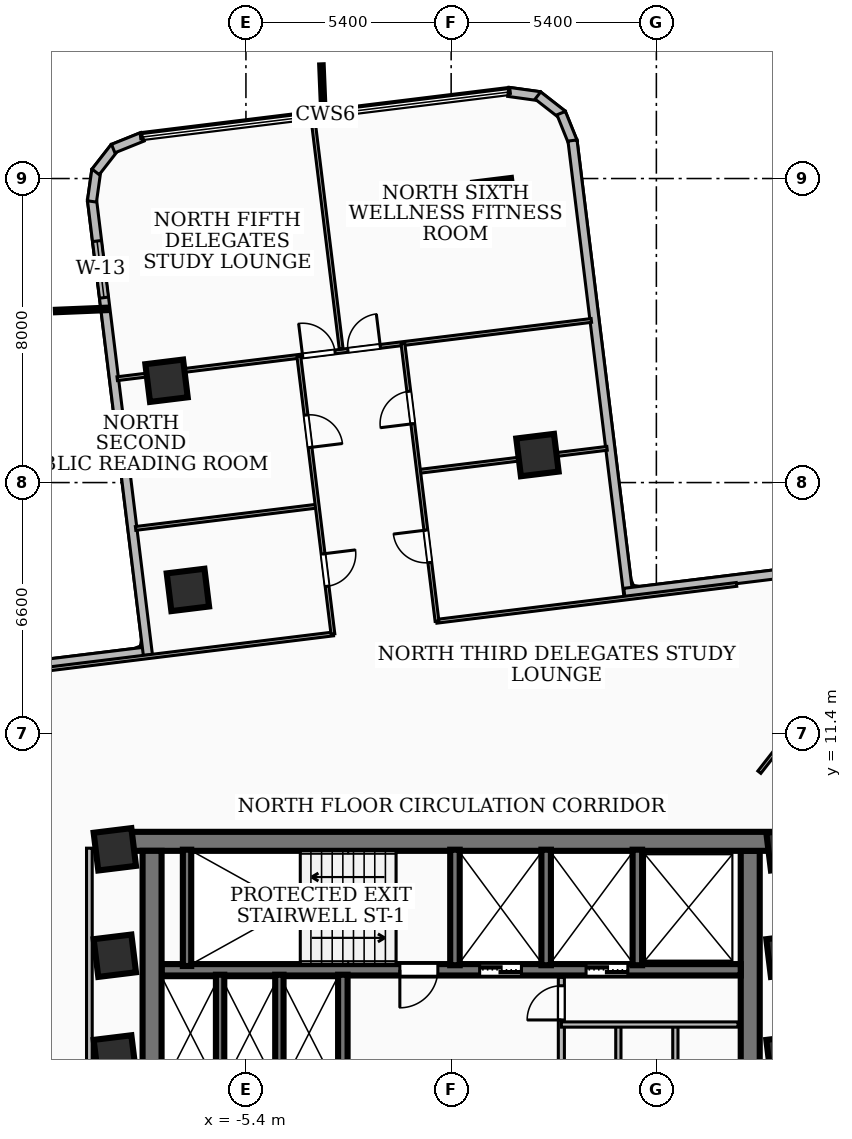
"""IFC4 building model, lengths in metres.
Left out: names, types, materials, properties, quantities, classifications, styles, units other than length and angle.
Written with IfcOpenShell. Run it as: python <this file> out.ifc"""

import sys

from ifc_helpers import new_model, si_unit, direction, frame, frame_2d, origin, origin_2d, place, context, subcontext, project, spatial, rectangle, extrude, element, fill, save


model = new_model("IFC4")
c1 = context("Model", 3, precision=1e-05, world=origin(), true_north=direction((0.0, 1.0)))
c2 = subcontext(c1, "Body", "Model", "MODEL_VIEW")
j1 = project(units=[si_unit("LENGTHUNIT", "METRE"), si_unit("PLANEANGLEUNIT", "RADIAN")], contexts=[c1])
p1 = place(None, origin())
s1 = spatial("IfcSite", under=j1, at=p1, CompositionType="ELEMENT")
p2 = place(p1, origin())
s2 = spatial("IfcBuilding", under=s1, at=p2, CompositionType="ELEMENT")
p3 = place(p2, frame((0.0, 0.0, 82.08)))
s3 = spatial("IfcBuildingStorey", under=s2, at=p3, CompositionType="ELEMENT", Elevation=82.08)
p4 = place(p3, frame((-8.78, 8.56, 0.0), z_axis=(0.0, 0.0, 1.0), x_axis=(1.0, 0.0, 0.0)))
e1 = element("IfcWall", 1, at=p4, inside=s3, PredefinedType="SHEAR", context=c2, shape_type="SweptSolid", body=[
    extrude(rectangle(XDim=17.56, YDim=0.5, at=frame_2d((8.78, 0.0))), origin(), (0.0, 0.0, 1.0), 3.34),
])
for number, where, z_axis, x_axis in (
    (2, (-7.87, 2.0, 0.0), (0.0, 0.0, 1.0), (0.0, 1.0, 0.0)),
    (3, (7.87, 8.31, 0.0), (0.0, 0.0, 1.0), (0.0, -1.0, 0.0)),
):
    element("IfcWall", number, at=place(p3, frame(where, z_axis=z_axis, x_axis=x_axis)), inside=s3, PredefinedType="SHEAR", context=c2, shape_type="SweptSolid", body=[
        extrude(rectangle(XDim=6.31, YDim=0.5, at=frame_2d((3.155, 0.0))), origin(), (0.0, 0.0, 1.0), 3.34),
    ])
p5 = place(p3, frame((7.62, 5.18, 0.0), z_axis=(0.0, 0.0, 1.0), x_axis=(-1.0, 0.0, 0.0)))
e4 = element("IfcWall", 4, at=p5, inside=s3, PredefinedType="SOLIDWALL", context=c2, shape_type="SweptSolid", body=[
    extrude(rectangle(XDim=15.24, YDim=0.3, at=frame_2d((7.62, 0.0))), origin(), (0.0, 0.0, 1.0), 3.34),
])
p6 = place(p5, frame((5.77, 0.0, 0.0)))
e5 = element("IfcOpeningElement", 5, at=p6, cuts=e4, PredefinedType="OPENING", context=c2, shape_type="SweptSolid", body=[
    extrude(rectangle(XDim=1.1, YDim=2.15, at=frame_2d((0.55, 1.075))), frame((0.0, 0.16, 0.0), z_axis=(0.0, -1.0, 0.0), x_axis=(1.0, 0.0, 0.0)), (0.0, 0.0, 1.0), 0.32),
])
p7 = place(p5, frame((2.97, 0.0, 0.0)))
e6 = element("IfcOpeningElement", 6, at=p7, cuts=e4, PredefinedType="OPENING", context=c2, shape_type="SweptSolid", body=[
    extrude(rectangle(XDim=1.1, YDim=2.15, at=frame_2d((0.55, 1.075))), frame((0.0, 0.16, 0.0), z_axis=(0.0, -1.0, 0.0), x_axis=(1.0, 0.0, 0.0)), (0.0, 0.0, 1.0), 0.32),
])
p8 = place(p5, frame((7.97, 0.0, 0.0)))
e7 = element("IfcOpeningElement", 7, at=p8, cuts=e4, PredefinedType="OPENING", context=c2, shape_type="SweptSolid", body=[
    extrude(rectangle(XDim=1.0, YDim=2.1, at=frame_2d((0.5, 1.05))), frame((0.0, 0.16, 0.0), z_axis=(0.0, -1.0, 0.0), x_axis=(1.0, 0.0, 0.0)), (0.0, 0.0, 1.0), 0.32),
])
p9 = place(p3, frame((-6.95, 5.28, 0.0), z_axis=(0.0, 0.0, 1.0), x_axis=(0.0, 1.0, 0.0)))
e8 = element("IfcWall", 8, at=p9, inside=s3, PredefinedType="SOLIDWALL", context=c2, shape_type="SweptSolid", body=[
    extrude(rectangle(XDim=3.06, YDim=0.22, at=frame_2d((1.53, 0.0))), origin(), (0.0, 0.0, 1.0), 3.34),
])
for number, where, z_axis, x_axis in (
    (9, (0.1, 5.3, 0.0), (0.0, 0.0, 1.0), (0.0, 1.0, 0.0)),
    (10, (2.5, 5.3, 0.0), (0.0, 0.0, 1.0), (0.0, 1.0, 0.0)),
    (11, (4.9, 5.3, 0.0), (0.0, 0.0, 1.0), (0.0, 1.0, 0.0)),
):
    element("IfcWall", number, at=place(p3, frame(where, z_axis=z_axis, x_axis=x_axis)), inside=s3, PredefinedType="SOLIDWALL", context=c2, shape_type="SweptSolid", body=[
        extrude(rectangle(XDim=3.04, YDim=0.25, at=frame_2d((1.52, 0.0))), origin(), (0.0, 0.0, 1.0), 3.34),
    ])
p10 = place(p3, frame((-2.85, 1.98, 0.0), z_axis=(0.0, 0.0, 1.0), x_axis=(0.0, 1.0, 0.0)))
e12 = element("IfcWall", 12, at=p10, inside=s3, PredefinedType="SOLIDWALL", context=c2, shape_type="SweptSolid", body=[
    extrude(rectangle(XDim=3.07, YDim=0.25, at=frame_2d((1.535, 0.0))), origin(), (0.0, 0.0, 1.0), 3.34),
])
for number, where, z_axis, x_axis in (
    (13, (-6.08, 1.98, 0.0), (0.0, 0.0, 1.0), (0.0, 1.0, 0.0)),
    (14, (-4.52, 1.98, 0.0), (0.0, 0.0, 1.0), (0.0, 1.0, 0.0)),
):
    element("IfcWall", number, at=place(p3, frame(where, z_axis=z_axis, x_axis=x_axis)), inside=s3, PredefinedType="SOLIDWALL", context=c2, shape_type="SweptSolid", body=[
        extrude(rectangle(XDim=3.07, YDim=0.22, at=frame_2d((1.535, 0.0))), origin(), (0.0, 0.0, 1.0), 3.34),
    ])
for number, where, z_axis, x_axis in (
    (15, (-8.85, 2.9, 0.0), (0.0, 0.0, 1.0), (0.993, 0.122, 0.0)),
    (16, (-8.85, 5.55, 0.0), (0.0, 0.0, 1.0), (0.993, 0.122, 0.0)),
    (17, (8.85, 2.9, 0.0), (0.0, 0.0, 1.0), (0.993, 0.122, 0.0)),
    (18, (8.85, 5.55, 0.0), (0.0, 0.0, 1.0), (0.993, 0.122, 0.0)),
    (19, (-8.85, 8.35, 0.0), (0.0, 0.0, 1.0), (0.993, 0.122, 0.0)),
    (20, (8.85, 8.35, 0.0), (0.0, 0.0, 1.0), (0.993, 0.122, 0.0)),
    (21, (2.271, 18.724, 0.0), (0.0, 0.0, 1.0), (0.993, 0.122, 0.0)),
    (22, (-6.927, 15.175, 0.0), (0.0, 0.0, 1.0), (0.993, 0.122, 0.0)),
    (23, (1.139, 25.457, 0.0), (0.0, 0.0, 1.0), (0.993, 0.122, 0.0)),
    (24, (-7.489, 20.679, 0.0), (0.0, 0.0, 1.0), (0.993, 0.122, 0.0)),
):
    element("IfcColumn", number, at=place(p3, frame(where, z_axis=z_axis, x_axis=x_axis)), inside=s3, PredefinedType="COLUMN", context=c2, shape_type="SweptSolid", body=[
        extrude(rectangle(XDim=1.0, YDim=1.0, at=origin_2d()), origin(), (0.0, 0.0, 1.0), 3.6),
    ])
p11 = place(p3, frame((-14.621, 12.743, 0.0), z_axis=(0.0, 0.0, 1.0), x_axis=(0.992536263595, 0.121949848087, 0.0)))
e25 = element("IfcWall", 25, at=p11, inside=s3, PredefinedType="SOLIDWALL", context=c2, shape_type="SweptSolid", body=[
    extrude(rectangle(XDim=6.775, YDim=0.24, at=frame_2d((3.387, 0.0))), origin(), (0.0, 0.0, 1.0), 3.34),
])
p12 = place(p3, frame((-7.98, 13.462, 0.0), z_axis=(0.0, 0.0, 1.0), x_axis=(-0.12189689255, 0.992542768644, 0.0)))
e26 = element("IfcWall", 26, at=p12, inside=s3, PredefinedType="SOLIDWALL", context=c2, shape_type="SweptSolid", body=[
    extrude(rectangle(XDim=12.075, YDim=0.24, at=frame_2d((6.038, 0.0))), origin(), (0.0, 0.0, 1.0), 3.34),
])
p13 = place(p12, frame((9.475, 0.0, 0.85)))
e27 = element("IfcOpeningElement", 27, at=p13, cuts=e26, PredefinedType="OPENING", context=c2, shape_type="SweptSolid", body=[
    extrude(rectangle(XDim=1.5, YDim=1.8, at=frame_2d((0.75, 0.9))), frame((0.0, 0.13, 0.0), z_axis=(0.0, -1.0, 0.0), x_axis=(1.0, 0.0, 0.0)), (0.0, 0.0, 1.0), 0.26),
])
p14 = place(p3, frame((-9.452, 25.397, 0.0), z_axis=(0.0, 0.0, 1.0), x_axis=(0.138376981782, 0.990379629694, 0.0)))
e28 = element("IfcWall", 28, at=p14, inside=s3, PredefinedType="SOLIDWALL", context=c2, shape_type="SweptSolid", body=[
    extrude(rectangle(XDim=0.831, YDim=0.24, at=frame_2d((0.416, 0.0))), origin(), (0.0, 0.0, 1.0), 3.34),
])
p15 = place(p3, frame((-9.355, 26.175, 0.0), z_axis=(0.0, 0.0, 1.0), x_axis=(0.614542882467, 0.788883416995, 0.0)))
e29 = element("IfcWall", 29, at=p15, inside=s3, PredefinedType="SOLIDWALL", context=c2, shape_type="SweptSolid", body=[
    extrude(rectangle(XDim=0.814, YDim=0.24, at=frame_2d((0.407, 0.0))), origin(), (0.0, 0.0, 1.0), 3.34),
])
p16 = place(p3, frame((-8.893, 26.788, 0.0), z_axis=(0.0, 0.0, 1.0), x_axis=(0.927724225254, 0.37326634174, 0.0)))
e30 = element("IfcWall", 30, at=p16, inside=s3, PredefinedType="SOLIDWALL", context=c2, shape_type="SweptSolid", body=[
    extrude(rectangle(XDim=0.83, YDim=0.24, at=frame_2d((0.415, 0.0))), origin(), (0.0, 0.0, 1.0), 3.34),
])
p17 = place(p3, frame((1.504, 28.28, 0.0), z_axis=(0.0, 0.0, 1.0), x_axis=(0.990540037659, -0.137224027762, 0.0)))
e31 = element("IfcWall", 31, at=p17, inside=s3, PredefinedType="SOLIDWALL", context=c2, shape_type="SweptSolid", body=[
    extrude(rectangle(XDim=0.831, YDim=0.24, at=frame_2d((0.416, 0.0))), origin(), (0.0, 0.0, 1.0), 3.34),
])
p18 = place(p3, frame((2.282, 28.184, 0.0), z_axis=(0.0, 0.0, 1.0), x_axis=(0.788415071083, -0.615143622001, 0.0)))
e32 = element("IfcWall", 32, at=p18, inside=s3, PredefinedType="SOLIDWALL", context=c2, shape_type="SweptSolid", body=[
    extrude(rectangle(XDim=0.814, YDim=0.24, at=frame_2d((0.407, 0.0))), origin(), (0.0, 0.0, 1.0), 3.34),
])
p19 = place(p3, frame((2.895, 27.721, 0.0), z_axis=(0.0, 0.0, 1.0), x_axis=(0.373927487679, -0.927457941881, 0.0)))
e33 = element("IfcWall", 33, at=p19, inside=s3, PredefinedType="SOLIDWALL", context=c2, shape_type="SweptSolid", body=[
    extrude(rectangle(XDim=0.829, YDim=0.24, at=frame_2d((0.415, 0.0))), origin(), (0.0, 0.0, 1.0), 3.34),
])
p20 = place(p3, frame((3.193, 27.0, 0.0), z_axis=(0.0, 0.0, 1.0), x_axis=(0.12189689255, -0.992542768644, 0.0)))
e34 = element("IfcWall", 34, at=p20, inside=s3, PredefinedType="SOLIDWALL", context=c2, shape_type="SweptSolid", body=[
    extrude(rectangle(XDim=12.075, YDim=0.24, at=frame_2d((6.038, 0.0))), origin(), (0.0, 0.0, 1.0), 2.486),
])
p21 = place(p3, frame((4.558, 15.098, 0.0), z_axis=(0.0, 0.0, 1.0), x_axis=(0.992537639855, 0.121938646341, 0.0)))
e35 = element("IfcWall", 35, at=p21, inside=s3, PredefinedType="SOLIDWALL", context=c2, shape_type="SweptSolid", body=[
    extrude(rectangle(XDim=6.595, YDim=0.24, at=frame_2d((3.298, 0.0))), origin(), (0.0, 0.0, 1.0), 2.486),
])
p22 = place(p3, frame((2.9, 2.04, 0.0), z_axis=(0.0, 0.0, 1.0), x_axis=(0.0, 1.0, 0.0)))
e36 = element("IfcWall", 36, at=p22, inside=s3, PredefinedType="PARTITIONING", context=c2, shape_type="SweptSolid", body=[
    extrude(rectangle(XDim=2.94, YDim=0.16, at=frame_2d((1.47, 0.0))), origin(), (0.0, 0.0, 1.0), 2.405),
])
p23 = place(p22, frame((1.82, 0.0, 0.0)))
e37 = element("IfcOpeningElement", 37, at=p23, cuts=e36, PredefinedType="OPENING", context=c2, shape_type="SweptSolid", body=[
    extrude(rectangle(XDim=0.9, YDim=2.06, at=frame_2d((0.45, 1.03))), frame((0.0, 0.09, 0.0), z_axis=(0.0, -1.0, 0.0), x_axis=(1.0, 0.0, 0.0)), (0.0, 0.0, 1.0), 0.18),
])
p24 = place(p3, frame((2.9, 3.74, 0.0), z_axis=(0.0, 0.0, 1.0), x_axis=(1.0, 0.0, 0.0)))
e38 = element("IfcWall", 38, at=p24, inside=s3, PredefinedType="PARTITIONING", context=c2, shape_type="SweptSolid", body=[
    extrude(rectangle(XDim=4.65, YDim=0.138, at=frame_2d((2.325, 0.0))), origin(), (0.0, 0.0, 1.0), 3.34),
])
for number, where, z_axis, x_axis in (
    (39, (4.4, 1.85, 0.0), (0.0, 0.0, 1.0), (0.0, 1.0, 0.0)),
    (40, (5.9, 1.85, 0.0), (0.0, 0.0, 1.0), (0.0, 1.0, 0.0)),
):
    element("IfcWall", number, at=place(p3, frame(where, z_axis=z_axis, x_axis=x_axis)), inside=s3, PredefinedType="PARTITIONING", context=c2, shape_type="SweptSolid", body=[
        extrude(rectangle(XDim=1.89, YDim=0.138, at=frame_2d((0.945, 0.0))), origin(), (0.0, 0.0, 1.0), 2.405),
    ])
p25 = place(p3, frame((-9.52, 1.75, 0.0), z_axis=(0.0, 0.0, 1.0), x_axis=(0.0, 1.0, 0.0)))
e41 = element("IfcWall", 41, at=p25, inside=s3, PredefinedType="PARTITIONING", context=c2, shape_type="SweptSolid", body=[
    extrude(rectangle(XDim=6.63, YDim=0.15, at=frame_2d((3.315, 0.0))), origin(), (0.0, 0.0, 1.0), 2.486),
])
p26 = place(p3, frame((8.11, 10.38, 0.0), z_axis=(0.0, 0.0, 1.0), x_axis=(0.615665236773, 0.788007814828, 0.0)))
e42 = element("IfcWall", 42, at=p26, inside=s3, PredefinedType="PARTITIONING", context=c2, shape_type="SweptSolid", body=[
    extrude(rectangle(XDim=6.482, YDim=0.1, at=frame_2d((3.241, 0.0))), origin(), (0.0, 0.0, 1.0), 3.34),
])
p27 = place(p3, frame((-3.101, 14.017, 0.0), z_axis=(0.0, 0.0, 1.0), x_axis=(-0.992524448483, -0.122045971517, 0.0)))
e43 = element("IfcWall", 43, at=p27, inside=s3, PredefinedType="PARTITIONING", context=c2, shape_type="SweptSolid", body=[
    extrude(rectangle(XDim=8.13, YDim=0.1, at=frame_2d((4.065, 0.0))), origin(), (0.0, 0.0, 1.0), 2.486),
])
p28 = place(p3, frame((7.509, 15.32, 0.0), z_axis=(0.0, 0.0, 1.0), x_axis=(-0.992529957607, -0.122001160868, 0.0)))
e44 = element("IfcWall", 44, at=p28, inside=s3, PredefinedType="PARTITIONING", context=c2, shape_type="SweptSolid", body=[
    extrude(rectangle(XDim=7.95, YDim=0.1, at=frame_2d((3.975, 0.0))), origin(), (0.0, 0.0, 1.0), 2.486),
])
p29 = place(p3, frame((-3.544, 17.378, 0.0), z_axis=(0.0, 0.0, 1.0), x_axis=(-0.992530372873, -0.121997782455, 0.0)))
e45 = element("IfcWall", 45, at=p29, inside=s3, PredefinedType="PARTITIONING", context=c2, shape_type="SweptSolid", body=[
    extrude(rectangle(XDim=4.795, YDim=0.1, at=frame_2d((2.397, 0.0))), origin(), (0.0, 0.0, 1.0), 2.486),
])
p30 = place(p3, frame((4.102, 18.901, 0.0), z_axis=(0.0, 0.0, 1.0), x_axis=(-0.992554700093, -0.121799701653, 0.0)))
e46 = element("IfcWall", 46, at=p30, inside=s3, PredefinedType="PARTITIONING", context=c2, shape_type="SweptSolid", body=[
    extrude(rectangle(XDim=4.975, YDim=0.1, at=frame_2d((2.488, 0.0))), origin(), (0.0, 0.0, 1.0), 2.486),
])
p31 = place(p3, frame((-4.008, 21.32, 0.0), z_axis=(0.0, 0.0, 1.0), x_axis=(0.12187066259, -0.992545989665, 0.0)))
e47 = element("IfcWall", 47, at=p31, inside=s3, PredefinedType="PARTITIONING", context=c2, shape_type="SweptSolid", body=[
    extrude(rectangle(XDim=7.36, YDim=0.1, at=frame_2d((3.68, 0.0))), origin(), (0.0, 0.0, 1.0), 3.34),
])
p32 = place(p31, frame((5.235, 0.0, 0.0)))
e48 = element("IfcOpeningElement", 48, at=p32, cuts=e47, PredefinedType="OPENING", context=c2, shape_type="SweptSolid", body=[
    extrude(rectangle(XDim=0.86, YDim=2.04, at=frame_2d((0.43, 1.02))), frame((0.0, 0.06, 0.0), z_axis=(0.0, -1.0, 0.0), x_axis=(1.0, 0.0, 0.0)), (0.0, 0.0, 1.0), 0.12),
])
p33 = place(p31, frame((1.555, 0.0, 0.0)))
e49 = element("IfcOpeningElement", 49, at=p33, cuts=e47, PredefinedType="OPENING", context=c2, shape_type="SweptSolid", body=[
    extrude(rectangle(XDim=0.86, YDim=2.04, at=frame_2d((0.43, 1.02))), frame((0.0, 0.06, 0.0), z_axis=(0.0, -1.0, 0.0), x_axis=(1.0, 0.0, 0.0)), (0.0, 0.0, 1.0), 0.12),
])
p34 = place(p3, frame((-0.372, 14.352, 0.0), z_axis=(0.0, 0.0, 1.0), x_axis=(-0.121874675173, 0.992545496968, 0.0)))
e50 = element("IfcWall", 50, at=p34, inside=s3, PredefinedType="PARTITIONING", context=c2, shape_type="SweptSolid", body=[
    extrude(rectangle(XDim=7.36, YDim=0.1, at=frame_2d((3.68, 0.0))), origin(), (0.0, 0.0, 1.0), 3.34),
])
p35 = place(p34, frame((1.555, 0.0, 0.0)))
e51 = element("IfcOpeningElement", 51, at=p35, cuts=e50, PredefinedType="OPENING", context=c2, shape_type="SweptSolid", body=[
    extrude(rectangle(XDim=0.86, YDim=2.04, at=frame_2d((0.43, 1.02))), frame((0.0, 0.06, 0.0), z_axis=(0.0, -1.0, 0.0), x_axis=(1.0, 0.0, 0.0)), (0.0, 0.0, 1.0), 0.12),
])
p36 = place(p34, frame((5.235, 0.0, 0.0)))
e52 = element("IfcOpeningElement", 52, at=p36, cuts=e50, PredefinedType="OPENING", context=c2, shape_type="SweptSolid", body=[
    extrude(rectangle(XDim=0.86, YDim=2.04, at=frame_2d((0.43, 1.02))), frame((0.0, 0.06, 0.0), z_axis=(0.0, -1.0, 0.0), x_axis=(1.0, 0.0, 0.0)), (0.0, 0.0, 1.0), 0.12),
])
p37 = place(p3, frame((-2.894, 21.518, 0.0), z_axis=(0.0, 0.0, 1.0), x_axis=(-0.121787270839, 0.992556225441, 0.0)))
e53 = element("IfcWall", 53, at=p37, inside=s3, PredefinedType="PARTITIONING", context=c2, shape_type="SweptSolid", body=[
    extrude(rectangle(XDim=6.084, YDim=0.1, at=frame_2d((3.042, 0.0))), origin(), (0.0, 0.0, 1.0), 2.793),
])
p38 = place(p3, frame((-8.787, 20.733, 0.0), z_axis=(0.0, 0.0, 1.0), x_axis=(0.992533310633, 0.121973879511, 0.0)))
e54 = element("IfcWall", 54, at=p38, inside=s3, PredefinedType="PARTITIONING", context=c2, shape_type="SweptSolid", body=[
    extrude(rectangle(XDim=12.57, YDim=0.1, at=frame_2d((6.285, 0.0))), origin(), (0.0, 0.0, 1.0), 2.486),
])
p39 = place(p38, frame((6.115, 0.0, 0.0)))
e55 = element("IfcOpeningElement", 55, at=p39, cuts=e54, PredefinedType="OPENING", context=c2, shape_type="SweptSolid", body=[
    extrude(rectangle(XDim=0.86, YDim=2.04, at=frame_2d((0.43, 1.02))), frame((0.0, 0.06, 0.0), z_axis=(0.0, -1.0, 0.0), x_axis=(1.0, 0.0, 0.0)), (0.0, 0.0, 1.0), 0.12),
])
p40 = place(p38, frame((4.915, 0.0, 0.0)))
e56 = element("IfcOpeningElement", 56, at=p40, cuts=e54, PredefinedType="OPENING", context=c2, shape_type="SweptSolid", body=[
    extrude(rectangle(XDim=0.86, YDim=2.04, at=frame_2d((0.43, 1.02))), frame((0.0, 0.06, 0.0), z_axis=(0.0, -1.0, 0.0), x_axis=(1.0, 0.0, 0.0)), (0.0, 0.0, 1.0), 0.12),
])
p41 = place(p13, origin())
e57 = element("IfcWindow", 57, at=p41, inside=s3, PartitioningType="SINGLE_PANEL", PredefinedType="WINDOW", context=c2, shape_type="SweptSolid", body=[
    extrude(rectangle(XDim=1.5, YDim=1.8, at=frame_2d((0.75, 0.9))), frame((0.0, 0.03, 0.0), z_axis=(0.0, -1.0, 0.0), x_axis=(1.0, 0.0, 0.0)), (0.0, 0.0, 1.0), 0.06),
])
fill(e27, e57)
p42 = place(p6, origin())
e58 = element("IfcDoor", 58, at=p42, inside=s3, OperationType="DOUBLE_DOOR_SLIDING", PredefinedType="DOOR", context=c2, shape_type="SweptSolid", body=[
    extrude(rectangle(XDim=1.1, YDim=2.15, at=frame_2d((0.55, 1.075))), frame((0.0, 0.025, 0.0), z_axis=(0.0, -1.0, 0.0), x_axis=(1.0, 0.0, 0.0)), (0.0, 0.0, 1.0), 0.05),
])
fill(e5, e58)
p43 = place(p7, origin())
e59 = element("IfcDoor", 59, at=p43, inside=s3, OperationType="DOUBLE_DOOR_SLIDING", PredefinedType="DOOR", context=c2, shape_type="SweptSolid", body=[
    extrude(rectangle(XDim=1.1, YDim=2.15, at=frame_2d((0.55, 1.075))), frame((0.0, 0.025, 0.0), z_axis=(0.0, -1.0, 0.0), x_axis=(1.0, 0.0, 0.0)), (0.0, 0.0, 1.0), 0.05),
])
fill(e6, e59)
p44 = place(p8, origin())
e60 = element("IfcDoor", 60, at=p44, inside=s3, OperationType="SINGLE_SWING_RIGHT", PredefinedType="DOOR", context=c2, shape_type="SweptSolid", body=[
    extrude(rectangle(XDim=1.0, YDim=2.1, at=frame_2d((0.5, 1.05))), frame((0.0, 0.025, 0.0), z_axis=(0.0, -1.0, 0.0), x_axis=(1.0, 0.0, 0.0)), (0.0, 0.0, 1.0), 0.05),
])
fill(e7, e60)
p45 = place(p23, origin())
e61 = element("IfcDoor", 61, at=p45, inside=s3, OperationType="SINGLE_SWING_LEFT", PredefinedType="DOOR", context=c2, shape_type="SweptSolid", body=[
    extrude(rectangle(XDim=0.9, YDim=2.06, at=frame_2d((0.45, 1.03))), frame((0.0, 0.025, 0.0), z_axis=(0.0, -1.0, 0.0), x_axis=(1.0, 0.0, 0.0)), (0.0, 0.0, 1.0), 0.05),
])
fill(e37, e61)
p46 = place(p32, origin())
e62 = element("IfcDoor", 62, at=p46, inside=s3, OperationType="SINGLE_SWING_LEFT", PredefinedType="DOOR", context=c2, shape_type="SweptSolid", body=[
    extrude(rectangle(XDim=0.86, YDim=2.04, at=frame_2d((0.43, 1.02))), frame((0.0, 0.025, 0.0), z_axis=(0.0, -1.0, 0.0), x_axis=(1.0, 0.0, 0.0)), (0.0, 0.0, 1.0), 0.05),
])
fill(e48, e62)
p47 = place(p33, origin())
e63 = element("IfcDoor", 63, at=p47, inside=s3, OperationType="SINGLE_SWING_RIGHT", PredefinedType="DOOR", context=c2, shape_type="SweptSolid", body=[
    extrude(rectangle(XDim=0.86, YDim=2.04, at=frame_2d((0.43, 1.02))), frame((0.0, 0.025, 0.0), z_axis=(0.0, -1.0, 0.0), x_axis=(1.0, 0.0, 0.0)), (0.0, 0.0, 1.0), 0.05),
])
fill(e49, e63)
p48 = place(p35, origin())
e64 = element("IfcDoor", 64, at=p48, inside=s3, OperationType="SINGLE_SWING_RIGHT", PredefinedType="DOOR", context=c2, shape_type="SweptSolid", body=[
    extrude(rectangle(XDim=0.86, YDim=2.04, at=frame_2d((0.43, 1.02))), frame((0.0, 0.025, 0.0), z_axis=(0.0, -1.0, 0.0), x_axis=(1.0, 0.0, 0.0)), (0.0, 0.0, 1.0), 0.05),
])
fill(e51, e64)
p49 = place(p36, origin())
e65 = element("IfcDoor", 65, at=p49, inside=s3, OperationType="SINGLE_SWING_LEFT", PredefinedType="DOOR", context=c2, shape_type="SweptSolid", body=[
    extrude(rectangle(XDim=0.86, YDim=2.04, at=frame_2d((0.43, 1.02))), frame((0.0, 0.025, 0.0), z_axis=(0.0, -1.0, 0.0), x_axis=(1.0, 0.0, 0.0)), (0.0, 0.0, 1.0), 0.05),
])
fill(e52, e65)
p50 = place(p39, origin())
e66 = element("IfcDoor", 66, at=p50, inside=s3, OperationType="SINGLE_SWING_RIGHT", PredefinedType="DOOR", context=c2, shape_type="SweptSolid", body=[
    extrude(rectangle(XDim=0.86, YDim=2.04, at=frame_2d((0.43, 1.02))), frame((0.0, 0.025, 0.0), z_axis=(0.0, -1.0, 0.0), x_axis=(1.0, 0.0, 0.0)), (0.0, 0.0, 1.0), 0.05),
])
fill(e55, e66)
p51 = place(p40, origin())
e67 = element("IfcDoor", 67, at=p51, inside=s3, OperationType="SINGLE_SWING_LEFT", PredefinedType="DOOR", context=c2, shape_type="SweptSolid", body=[
    extrude(rectangle(XDim=0.86, YDim=2.04, at=frame_2d((0.43, 1.02))), frame((0.0, 0.025, 0.0), z_axis=(0.0, -1.0, 0.0), x_axis=(1.0, 0.0, 0.0)), (0.0, 0.0, 1.0), 0.05),
])
fill(e56, e67)
save(model, sys.argv[1])
